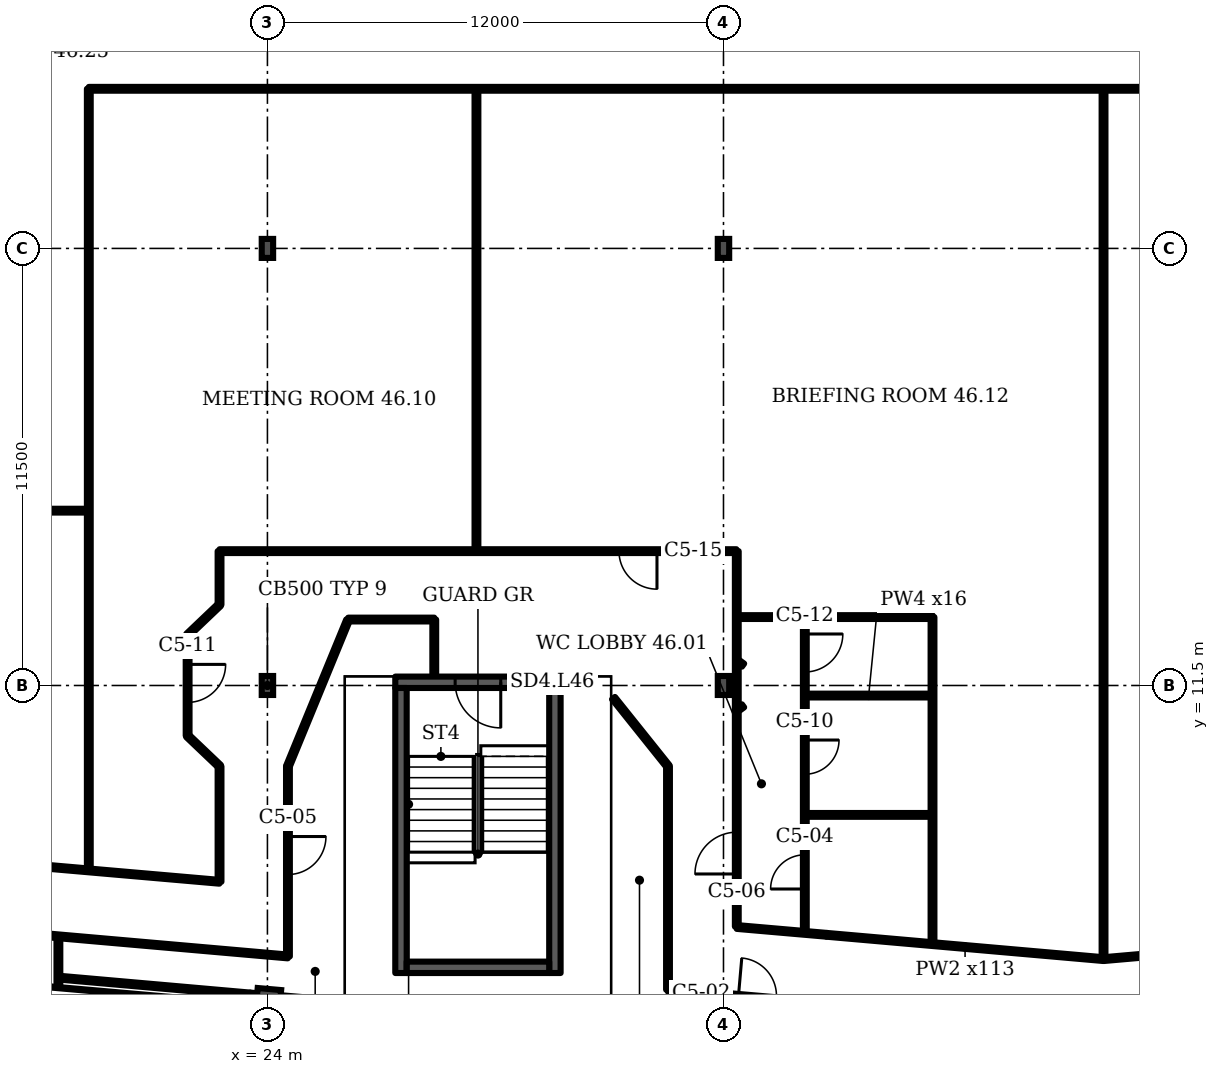
"""IFC4 building model, lengths in metres.
Left out: names, types, materials, properties, quantities, classifications, styles, units other than length and angle.
Written with IfcOpenShell. Run it as: python <this file> out.ifc"""

import sys

from ifc_helpers import new_model, si_unit, direction, frame, frame_2d, origin, origin_2d, place, context, subcontext, project, spatial, rectangle, i_section, extrude, element, fill, save


model = new_model("IFC4")
c1 = context("Model", 3, precision=1e-05, world=origin(), true_north=direction((0.0, 1.0)))
c2 = subcontext(c1, "Body", "Model", "MODEL_VIEW")
j1 = project(units=[si_unit("LENGTHUNIT", "METRE"), si_unit("PLANEANGLEUNIT", "RADIAN")], contexts=[c1])
p1 = place(None, origin())
s1 = spatial("IfcSite", under=j1, at=p1, CompositionType="ELEMENT")
p2 = place(p1, origin())
s2 = spatial("IfcBuilding", under=s1, at=p2, CompositionType="ELEMENT")
p3 = place(p2, frame((0.0, 0.0, 187.9)))
s3 = spatial("IfcBuildingStorey", under=s2, at=p3, CompositionType="ELEMENT", Elevation=187.9)
p4 = place(p3, frame((24.039, 3.361, 0.0), z_axis=(0.0, 0.0, 1.0), x_axis=(-0.087156, -0.996198, 0.0)))
e1 = element("IfcColumn", 1, at=p4, inside=s3, PredefinedType="COLUMN", context=c2, shape_type="SweptSolid", body=[
    extrude(i_section(OverallWidth=0.305, OverallDepth=0.62, WebThickness=0.021, FlangeThickness=0.04, FilletRadius=0.027, at=origin_2d()), origin(), (0.0, 0.0, 1.0), 3.6),
])
for number, where, z_axis, x_axis in (
    (2, (24.0, 11.5, 0.0), (0.0, 0.0, 1.0), (1.0, 0.0, 0.0)),
    (3, (36.0, 11.5, 0.0), (0.0, 0.0, 1.0), (1.0, 0.0, 0.0)),
    (4, (24.0, 23.0, 0.0), (0.0, 0.0, 1.0), (1.0, 0.0, 0.0)),
    (5, (36.0, 23.0, 0.0), (0.0, 0.0, 1.0), (1.0, 0.0, 0.0)),
):
    element("IfcColumn", number, at=place(p3, frame(where, z_axis=z_axis, x_axis=x_axis)), inside=s3, PredefinedType="COLUMN", context=c2, shape_type="SweptSolid", body=[
        extrude(i_section(OverallWidth=0.3, OverallDepth=0.5, WebThickness=0.014, FlangeThickness=0.028, FilletRadius=0.027, at=origin_2d()), origin(), (0.0, 0.0, 1.0), 3.6),
    ])
p5 = place(p3, frame((12.835, 3.885, 0.0), z_axis=(0.0, 0.0, 1.0), x_axis=(0.996199, -0.087154, 0.0)))
e6 = element("IfcWall", 6, at=p5, inside=s3, PredefinedType="SOLIDWALL", context=c2, shape_type="SweptSolid", body=[
    extrude(rectangle(XDim=11.177, YDim=0.35, at=frame_2d((5.588, 0.0))), origin(), (0.0, 0.0, 1.0), 1.0),
])
p6 = place(p3, frame((27.364, 11.584, 0.0), z_axis=(0.0, 0.0, 1.0), x_axis=(1.0, 0.0, 0.0)))
e7 = element("IfcWall", 7, at=p6, inside=s3, PredefinedType="SHEAR", context=c2, shape_type="SweptSolid", body=[
    extrude(rectangle(XDim=4.35, YDim=0.3, at=frame_2d((2.175, 0.0))), origin(), (0.0, 0.0, 1.0), 3.2),
])
p7 = place(p6, frame((1.575, 0.0, 0.0)))
e8 = element("IfcOpeningElement", 8, at=p7, cuts=e7, PredefinedType="OPENING", context=c2, shape_type="SweptSolid", body=[
    extrude(rectangle(XDim=1.2, YDim=2.1, at=frame_2d((0.6, 1.05))), frame((0.0, 0.16, 0.0), z_axis=(0.0, -1.0, 0.0), x_axis=(1.0, 0.0, 0.0)), (0.0, 0.0, 1.0), 0.32),
])
p8 = place(p3, frame((10.3, 16.1, 0.0), z_axis=(0.0, 0.0, 1.0), x_axis=(1.0, 0.0, 0.0)))
e9 = element("IfcWall", 9, at=p8, inside=s3, PredefinedType="PARTITIONING", context=c2, shape_type="SweptSolid", body=[
    extrude(rectangle(XDim=9.0, YDim=0.1, at=frame_2d((4.5, 0.0))), origin(), (0.0, 0.0, 1.0), 3.2),
])
p9 = place(p3, frame((18.5, 3.425, 0.0), z_axis=(0.0, 0.0, 1.0), x_axis=(0.0, 1.0, 0.0)))
e10 = element("IfcWall", 10, at=p9, inside=s3, PredefinedType="PARTITIONING", context=c2, shape_type="SweptSolid", body=[
    extrude(rectangle(XDim=1.475, YDim=0.1, at=frame_2d((0.737, 0.0))), origin(), (0.0, 0.0, 1.0), 2.58),
])
p10 = place(p3, frame((19.3, 6.705, 0.0), z_axis=(0.0, 0.0, 1.0), x_axis=(0.0, 1.0, 0.0)))
e11 = element("IfcWall", 11, at=p10, inside=s3, PredefinedType="PARTITIONING", context=c2, shape_type="SweptSolid", body=[
    extrude(rectangle(XDim=20.495, YDim=0.1, at=frame_2d((10.248, 0.0))), origin(), (0.0, 0.0, 1.0), 3.2),
])
p11 = place(p3, frame((19.3, 27.2, 0.0), z_axis=(0.0, 0.0, 1.0), x_axis=(1.0, 0.0, 0.0)))
e12 = element("IfcWall", 12, at=p11, inside=s3, PredefinedType="PARTITIONING", context=c2, shape_type="SweptSolid", body=[
    extrude(rectangle(XDim=41.305, YDim=0.1, at=frame_2d((20.652, 0.0))), origin(), (0.0, 0.0, 1.0), 3.2),
])
p12 = place(p11, frame((32.32, 0.0, 0.0)))
e13 = element("IfcOpeningElement", 13, at=p12, cuts=e12, PredefinedType="OPENING", context=c2, shape_type="SweptSolid", body=[
    extrude(rectangle(XDim=1.8, YDim=2.1, at=frame_2d((0.9, 1.05))), frame((0.0, 0.06, 0.0), z_axis=(0.0, -1.0, 0.0), x_axis=(1.0, 0.0, 0.0)), (0.0, 0.0, 1.0), 0.12),
])
p13 = place(p3, frame((21.9, 12.825, 0.0), z_axis=(0.0, 0.0, 1.0), x_axis=(0.724157, 0.689643, 0.0)))
e14 = element("IfcWall", 14, at=p13, inside=s3, PredefinedType="PARTITIONING", context=c2, shape_type="SweptSolid", body=[
    extrude(rectangle(XDim=1.16, YDim=0.1, at=frame_2d((0.58, 0.0))), origin(), (0.0, 0.0, 1.0), 3.2),
])
p14 = place(p3, frame((21.9, 10.175, 0.0), z_axis=(0.0, 0.0, 1.0), x_axis=(0.0, 1.0, 0.0)))
e15 = element("IfcWall", 15, at=p14, inside=s3, PredefinedType="PARTITIONING", context=c2, shape_type="SweptSolid", body=[
    extrude(rectangle(XDim=2.65, YDim=0.1, at=frame_2d((1.325, 0.0))), origin(), (0.0, 0.0, 1.0), 3.2),
])
p15 = place(p14, frame((0.88, 0.0, 0.0)))
e16 = element("IfcOpeningElement", 16, at=p15, cuts=e15, PredefinedType="OPENING", context=c2, shape_type="SweptSolid", body=[
    extrude(rectangle(XDim=1.0, YDim=2.1, at=frame_2d((0.5, 1.05))), frame((0.0, 0.06, 0.0), z_axis=(0.0, -1.0, 0.0), x_axis=(1.0, 0.0, 0.0)), (0.0, 0.0, 1.0), 0.12),
])
p16 = place(p3, frame((22.74, 9.375, 0.0), z_axis=(0.0, 0.0, 1.0), x_axis=(-0.724157, 0.689643, 0.0)))
e17 = element("IfcWall", 17, at=p16, inside=s3, PredefinedType="PARTITIONING", context=c2, shape_type="SweptSolid", body=[
    extrude(rectangle(XDim=1.16, YDim=0.1, at=frame_2d((0.58, 0.0))), origin(), (0.0, 0.0, 1.0), 3.2),
])
p17 = place(p3, frame((22.74, 6.335, 0.0), z_axis=(0.0, 0.0, 1.0), x_axis=(-0.996229, 0.086722, 0.0)))
e18 = element("IfcWall", 18, at=p17, inside=s3, PredefinedType="PARTITIONING", context=c2, shape_type="SweptSolid", body=[
    extrude(rectangle(XDim=6.478, YDim=0.1, at=frame_2d((3.239, 0.0))), origin(), (0.0, 0.0, 1.0), 3.2),
])
p18 = place(p3, frame((22.74, 6.335, 0.0), z_axis=(0.0, 0.0, 1.0), x_axis=(0.0, 1.0, 0.0)))
e19 = element("IfcWall", 19, at=p18, inside=s3, PredefinedType="PARTITIONING", context=c2, shape_type="SweptSolid", body=[
    extrude(rectangle(XDim=3.04, YDim=0.1, at=frame_2d((1.52, 0.0))), origin(), (0.0, 0.0, 1.0), 3.2),
])
p19 = place(p3, frame((22.74, 13.625, 0.0), z_axis=(0.0, 0.0, 1.0), x_axis=(0.0, 1.0, 0.0)))
e20 = element("IfcWall", 20, at=p19, inside=s3, PredefinedType="PARTITIONING", context=c2, shape_type="SweptSolid", body=[
    extrude(rectangle(XDim=1.41, YDim=0.1, at=frame_2d((0.705, 0.0))), origin(), (0.0, 0.0, 1.0), 3.2),
])
p20 = place(p3, frame((22.74, 15.035, 0.0), z_axis=(0.0, 0.0, 1.0), x_axis=(1.0, 0.0, 0.0)))
e21 = element("IfcWall", 21, at=p20, inside=s3, PredefinedType="PARTITIONING", context=c2, shape_type="SweptSolid", body=[
    extrude(rectangle(XDim=13.6, YDim=0.1, at=frame_2d((6.8, 0.0))), origin(), (0.0, 0.0, 1.0), 3.2),
])
p21 = place(p20, frame((10.51, 0.0, 0.0)))
e22 = element("IfcOpeningElement", 22, at=p21, cuts=e21, PredefinedType="OPENING", context=c2, shape_type="SweptSolid", body=[
    extrude(rectangle(XDim=1.0, YDim=2.1, at=frame_2d((0.5, 1.05))), frame((0.0, 0.06, 0.0), z_axis=(0.0, -1.0, 0.0), x_axis=(1.0, 0.0, 0.0)), (0.0, 0.0, 1.0), 0.12),
])
p22 = place(p3, frame((23.54, 3.37, 0.0), z_axis=(0.0, 0.0, 1.0), x_axis=(-0.996148, 0.087735, 0.0)))
e23 = element("IfcWall", 23, at=p22, inside=s3, PredefinedType="PARTITIONING", context=c2, shape_type="SweptSolid", body=[
    extrude(rectangle(XDim=5.014, YDim=0.1, at=frame_2d((2.507, 0.0))), origin(), (0.0, 0.0, 1.0), 2.58),
])
p23 = place(p3, frame((24.54, 9.375, 0.0), z_axis=(0.0, 0.0, 1.0), x_axis=(0.380187, 0.924914, 0.0)))
e24 = element("IfcWall", 24, at=p23, inside=s3, PredefinedType="PARTITIONING", context=c2, shape_type="SweptSolid", body=[
    extrude(rectangle(XDim=4.156, YDim=0.1, at=frame_2d((2.078, 0.0))), origin(), (0.0, 0.0, 1.0), 3.2),
])
p24 = place(p3, frame((24.54, 4.37, 0.0), z_axis=(0.0, 0.0, 1.0), x_axis=(0.0, 1.0, 0.0)))
e25 = element("IfcWall", 25, at=p24, inside=s3, PredefinedType="PARTITIONING", context=c2, shape_type="SweptSolid", body=[
    extrude(rectangle(XDim=5.005, YDim=0.1, at=frame_2d((2.502, 0.0))), origin(), (0.0, 0.0, 1.0), 3.2),
])
p25 = place(p24, frame((2.156, 0.0, 0.0)))
e26 = element("IfcOpeningElement", 26, at=p25, cuts=e25, PredefinedType="OPENING", context=c2, shape_type="SweptSolid", body=[
    extrude(rectangle(XDim=1.0, YDim=2.1, at=frame_2d((0.5, 1.05))), frame((0.0, 0.06, 0.0), z_axis=(0.0, -1.0, 0.0), x_axis=(1.0, 0.0, 0.0)), (0.0, 0.0, 1.0), 0.12),
])
p26 = place(p3, frame((24.54, 4.37, 0.0), z_axis=(0.0, 0.0, 1.0), x_axis=(-0.996178, 0.08739, 0.0)))
e27 = element("IfcWall", 27, at=p26, inside=s3, PredefinedType="PARTITIONING", context=c2, shape_type="SweptSolid", body=[
    extrude(rectangle(XDim=10.077, YDim=0.1, at=frame_2d((5.039, 0.0))), origin(), (0.0, 0.0, 1.0), 3.2),
])
p27 = place(p3, frame((26.019, 3.157, 0.0), z_axis=(0.0, 0.0, 1.0), x_axis=(-0.996317, 0.085749, 0.0)))
e28 = element("IfcWall", 28, at=p27, inside=s3, PredefinedType="PARTITIONING", context=c2, shape_type="SweptSolid", body=[
    extrude(rectangle(XDim=2.489, YDim=0.1, at=frame_2d((1.244, 0.0))), origin(), (0.0, 0.0, 1.0), 2.58),
])
p28 = place(p3, frame((26.125, 13.235, 0.0), z_axis=(0.0, 0.0, 1.0), x_axis=(1.0, 0.0, 0.0)))
e29 = element("IfcWall", 29, at=p28, inside=s3, PredefinedType="PARTITIONING", context=c2, shape_type="SweptSolid", body=[
    extrude(rectangle(XDim=2.265, YDim=0.1, at=frame_2d((1.132, 0.0))), origin(), (0.0, 0.0, 1.0), 3.2),
])
p29 = place(p3, frame((28.39, 11.754, 0.0), z_axis=(0.0, 0.0, 1.0), x_axis=(0.0, 1.0, 0.0)))
e30 = element("IfcWall", 30, at=p29, inside=s3, PredefinedType="PARTITIONING", context=c2, shape_type="SweptSolid", body=[
    extrude(rectangle(XDim=1.481, YDim=0.1, at=frame_2d((0.74, 0.0))), origin(), (0.0, 0.0, 1.0), 3.2),
])
p30 = place(p3, frame((29.5, 15.035, 0.0), z_axis=(0.0, 0.0, 1.0), x_axis=(0.0, 1.0, 0.0)))
e31 = element("IfcWall", 31, at=p30, inside=s3, PredefinedType="PARTITIONING", context=c2, shape_type="SweptSolid", body=[
    extrude(rectangle(XDim=12.165, YDim=0.1, at=frame_2d((6.083, 0.0))), origin(), (0.0, 0.0, 1.0), 3.2),
])
p31 = place(p3, frame((34.54, 3.495, 0.0), z_axis=(0.0, 0.0, 1.0), x_axis=(0.0, 1.0, 0.0)))
e32 = element("IfcWall", 32, at=p31, inside=s3, PredefinedType="PARTITIONING", context=c2, shape_type="SweptSolid", body=[
    extrude(rectangle(XDim=5.88, YDim=0.1, at=frame_2d((2.94, 0.0))), origin(), (0.0, 0.0, 1.0), 3.2),
])
p32 = place(p3, frame((34.54, 9.375, 0.0), z_axis=(0.0, 0.0, 1.0), x_axis=(-0.624735, 0.780839, 0.0)))
e33 = element("IfcWall", 33, at=p32, inside=s3, PredefinedType="PARTITIONING", context=c2, shape_type="SweptSolid", body=[
    extrude(rectangle(XDim=2.296, YDim=0.1, at=frame_2d((1.148, 0.0))), origin(), (0.0, 0.0, 1.0), 3.2),
])
p33 = place(p3, frame((36.35, 5.155, 0.0), z_axis=(0.0, 0.0, 1.0), x_axis=(0.0, 1.0, 0.0)))
e34 = element("IfcWall", 34, at=p33, inside=s3, PredefinedType="PARTITIONING", context=c2, shape_type="SweptSolid", body=[
    extrude(rectangle(XDim=9.88, YDim=0.1, at=frame_2d((4.94, 0.0))), origin(), (0.0, 0.0, 1.0), 3.2),
])
p34 = place(p33, frame((1.385, 0.0, 0.0)))
e35 = element("IfcOpeningElement", 35, at=p34, cuts=e34, PredefinedType="OPENING", context=c2, shape_type="SweptSolid", body=[
    extrude(rectangle(XDim=1.1, YDim=2.1, at=frame_2d((0.55, 1.05))), frame((0.0, 0.06, 0.0), z_axis=(0.0, -1.0, 0.0), x_axis=(1.0, 0.0, 0.0)), (0.0, 0.0, 1.0), 0.12),
])
p35 = place(p3, frame((36.35, 10.845, 0.0), z_axis=(0.0, 0.0, 1.0), x_axis=(0.808115, 0.589026, 0.0)))
e36 = element("IfcWall", 36, at=p35, inside=s3, PredefinedType="PARTITIONING", context=c2, shape_type="SweptSolid", body=[
    extrude(rectangle(XDim=0.204, YDim=0.1, at=frame_2d((0.102, 0.0))), origin(), (0.0, 0.0, 1.0), 3.2),
])
p36 = place(p3, frame((36.35, 13.3, 0.0), z_axis=(0.0, 0.0, 1.0), x_axis=(1.0, 0.0, 0.0)))
e37 = element("IfcWall", 37, at=p36, inside=s3, PredefinedType="PARTITIONING", context=c2, shape_type="SweptSolid", body=[
    extrude(rectangle(XDim=5.15, YDim=0.1, at=frame_2d((2.575, 0.0))), origin(), (0.0, 0.0, 1.0), 3.2),
])
p37 = place(p3, frame((36.515, 12.035, 0.0), z_axis=(0.0, 0.0, 1.0), x_axis=(-0.808115, 0.589026, 0.0)))
e38 = element("IfcWall", 38, at=p37, inside=s3, PredefinedType="PARTITIONING", context=c2, shape_type="SweptSolid", body=[
    extrude(rectangle(XDim=0.204, YDim=0.1, at=frame_2d((0.102, 0.0))), origin(), (0.0, 0.0, 1.0), 3.2),
])
p38 = place(p3, frame((38.14, 5.0, 0.0), z_axis=(0.0, 0.0, 1.0), x_axis=(0.0, 1.0, 0.0)))
e39 = element("IfcWall", 39, at=p38, inside=s3, PredefinedType="PARTITIONING", context=c2, shape_type="SweptSolid", body=[
    extrude(rectangle(XDim=8.3, YDim=0.1, at=frame_2d((4.15, 0.0))), origin(), (0.0, 0.0, 1.0), 3.2),
])
p39 = place(p38, frame((1.145, 0.0, 0.0)))
e40 = element("IfcOpeningElement", 40, at=p39, cuts=e39, PredefinedType="OPENING", context=c2, shape_type="SweptSolid", body=[
    extrude(rectangle(XDim=0.9, YDim=2.1, at=frame_2d((0.45, 1.05))), frame((0.0, 0.06, 0.0), z_axis=(0.0, -1.0, 0.0), x_axis=(1.0, 0.0, 0.0)), (0.0, 0.0, 1.0), 0.12),
])
p40 = place(p38, frame((4.165, 0.0, 0.0)))
e41 = element("IfcOpeningElement", 41, at=p40, cuts=e39, PredefinedType="OPENING", context=c2, shape_type="SweptSolid", body=[
    extrude(rectangle(XDim=0.9, YDim=2.1, at=frame_2d((0.45, 1.05))), frame((0.0, 0.06, 0.0), z_axis=(0.0, -1.0, 0.0), x_axis=(1.0, 0.0, 0.0)), (0.0, 0.0, 1.0), 0.12),
])
p41 = place(p38, frame((6.855, 0.0, 0.0)))
e42 = element("IfcOpeningElement", 42, at=p41, cuts=e39, PredefinedType="OPENING", context=c2, shape_type="SweptSolid", body=[
    extrude(rectangle(XDim=1.0, YDim=2.1, at=frame_2d((0.5, 1.05))), frame((0.0, 0.06, 0.0), z_axis=(0.0, -1.0, 0.0), x_axis=(1.0, 0.0, 0.0)), (0.0, 0.0, 1.0), 0.12),
])
for number, where, z_axis, x_axis in (
    (43, (38.14, 8.095, 0.0), (0.0, 0.0, 1.0), (1.0, 0.0, 0.0)),
    (44, (38.14, 11.235, 0.0), (0.0, 0.0, 1.0), (1.0, 0.0, 0.0)),
):
    element("IfcWall", number, at=place(p3, frame(where, z_axis=z_axis, x_axis=x_axis)), inside=s3, PredefinedType="PARTITIONING", context=c2, shape_type="SweptSolid", body=[
        extrude(rectangle(XDim=3.36, YDim=0.1, at=frame_2d((1.68, 0.0))), origin(), (0.0, 0.0, 1.0), 3.2),
    ])
p42 = place(p3, frame((38.715, 4.94, 0.0), z_axis=(0.0, 0.0, 1.0), x_axis=(-0.996236, 0.086674, 0.0)))
e45 = element("IfcWall", 45, at=p42, inside=s3, PredefinedType="PARTITIONING", context=c2, shape_type="SweptSolid", body=[
    extrude(rectangle(XDim=2.372, YDim=0.1, at=frame_2d((1.186, 0.0))), origin(), (0.0, 0.0, 1.0), 3.2),
])
p43 = place(p3, frame((41.5, 4.695, 0.0), z_axis=(0.0, 0.0, 1.0), x_axis=(0.0, 1.0, 0.0)))
e46 = element("IfcWall", 46, at=p43, inside=s3, PredefinedType="PARTITIONING", context=c2, shape_type="SweptSolid", body=[
    extrude(rectangle(XDim=8.605, YDim=0.1, at=frame_2d((4.302, 0.0))), origin(), (0.0, 0.0, 1.0), 3.2),
])
p44 = place(p3, frame((46.0, 4.3, 0.0), z_axis=(0.0, 0.0, 1.0), x_axis=(-0.996173, 0.087448, 0.0)))
e47 = element("IfcWall", 47, at=p44, inside=s3, PredefinedType="PARTITIONING", context=c2, shape_type="SweptSolid", body=[
    extrude(rectangle(XDim=7.315, YDim=0.1, at=frame_2d((3.657, 0.0))), origin(), (0.0, 0.0, 1.0), 3.2),
])
p45 = place(p3, frame((46.0, 2.495, 0.0), z_axis=(0.0, 0.0, 1.0), x_axis=(-0.996214, 0.08693, 0.0)))
e48 = element("IfcWall", 48, at=p45, inside=s3, PredefinedType="PARTITIONING", context=c2, shape_type="SweptSolid", body=[
    extrude(rectangle(XDim=11.503, YDim=0.1, at=frame_2d((5.752, 0.0))), origin(), (0.0, 0.0, 1.0), 3.2),
])
p46 = place(p45, frame((8.642, 0.0, 0.0)))
e49 = element("IfcOpeningElement", 49, at=p46, cuts=e48, PredefinedType="OPENING", context=c2, shape_type="SweptSolid", body=[
    extrude(rectangle(XDim=1.0, YDim=2.1, at=frame_2d((0.5, 1.05))), frame((0.0, 0.06, 0.0), z_axis=(0.0, -1.0, 0.0), x_axis=(1.0, 0.0, 0.0)), (0.0, 0.0, 1.0), 0.12),
])
p47 = place(p3, frame((46.0, 4.3, 0.0), z_axis=(0.0, 0.0, 1.0), x_axis=(0.0, 1.0, 0.0)))
e50 = element("IfcWall", 50, at=p47, inside=s3, PredefinedType="PARTITIONING", context=c2, shape_type="SweptSolid", body=[
    extrude(rectangle(XDim=22.9, YDim=0.1, at=frame_2d((11.45, 0.0))), origin(), (0.0, 0.0, 1.0), 3.2),
])
p48 = place(p3, frame((46.0, 4.3, 0.0), z_axis=(0.0, 0.0, 1.0), x_axis=(0.996189, 0.087194, 0.0)))
e51 = element("IfcWall", 51, at=p48, inside=s3, PredefinedType="PARTITIONING", context=c2, shape_type="SweptSolid", body=[
    extrude(rectangle(XDim=12.558, YDim=0.1, at=frame_2d((6.279, 0.0))), origin(), (0.0, 0.0, 1.0), 3.2),
])
for number, where, z_axis, x_axis in (
    (52, (27.514, 3.934, 0.0), (0.0, 0.0, 1.0), (0.0, 1.0, 0.0)),
    (53, (31.564, 3.934, 0.0), (0.0, 0.0, 1.0), (0.0, 1.0, 0.0)),
):
    element("IfcWall", number, at=place(p3, frame(where, z_axis=z_axis, x_axis=x_axis)), inside=s3, PredefinedType="SHEAR", context=c2, shape_type="SweptSolid", body=[
        extrude(rectangle(XDim=7.5, YDim=0.3, at=frame_2d((3.75, 0.0))), origin(), (0.0, 0.0, 1.0), 3.2),
    ])
p49 = place(p3, frame((27.664, 4.084, 0.0), z_axis=(0.0, 0.0, 1.0), x_axis=(1.0, 0.0, 0.0)))
e54 = element("IfcWall", 54, at=p49, inside=s3, PredefinedType="SHEAR", context=c2, shape_type="SweptSolid", body=[
    extrude(rectangle(XDim=3.75, YDim=0.3, at=frame_2d((1.875, 0.0))), origin(), (0.0, 0.0, 1.0), 3.2),
])
p50 = place(p7, origin())
e55 = element("IfcDoor", 55, at=p50, inside=s3, OperationType="SINGLE_SWING_RIGHT", PredefinedType="DOOR", context=c2, shape_type="SweptSolid", body=[
    extrude(rectangle(XDim=1.2, YDim=2.1, at=frame_2d((0.6, 1.05))), frame((0.0, 0.025, 0.0), z_axis=(0.0, -1.0, 0.0), x_axis=(1.0, 0.0, 0.0)), (0.0, 0.0, 1.0), 0.05),
])
fill(e8, e55)
p51 = place(p46, origin())
e56 = element("IfcDoor", 56, at=p51, inside=s3, OperationType="SINGLE_SWING_RIGHT", PredefinedType="DOOR", context=c2, shape_type="SweptSolid", body=[
    extrude(rectangle(XDim=1.0, YDim=2.1, at=frame_2d((0.5, 1.05))), frame((0.0, 0.025, 0.0), z_axis=(0.0, -1.0, 0.0), x_axis=(1.0, 0.0, 0.0)), (0.0, 0.0, 1.0), 0.05),
])
fill(e49, e56)
p52 = place(p39, origin())
e57 = element("IfcDoor", 57, at=p52, inside=s3, OperationType="SINGLE_SWING_LEFT", PredefinedType="DOOR", context=c2, shape_type="SweptSolid", body=[
    extrude(rectangle(XDim=0.9, YDim=2.1, at=frame_2d((0.45, 1.05))), frame((0.0, 0.025, 0.0), z_axis=(0.0, -1.0, 0.0), x_axis=(1.0, 0.0, 0.0)), (0.0, 0.0, 1.0), 0.05),
])
fill(e40, e57)
p53 = place(p25, origin())
e58 = element("IfcDoor", 58, at=p53, inside=s3, OperationType="SINGLE_SWING_RIGHT", PredefinedType="DOOR", context=c2, shape_type="SweptSolid", body=[
    extrude(rectangle(XDim=1.0, YDim=2.1, at=frame_2d((0.5, 1.05))), frame((0.0, 0.025, 0.0), z_axis=(0.0, -1.0, 0.0), x_axis=(1.0, 0.0, 0.0)), (0.0, 0.0, 1.0), 0.05),
])
fill(e26, e58)
p54 = place(p34, origin())
e59 = element("IfcDoor", 59, at=p54, inside=s3, OperationType="SINGLE_SWING_LEFT", PredefinedType="DOOR", context=c2, shape_type="SweptSolid", body=[
    extrude(rectangle(XDim=1.1, YDim=2.1, at=frame_2d((0.55, 1.05))), frame((0.0, 0.025, 0.0), z_axis=(0.0, -1.0, 0.0), x_axis=(1.0, 0.0, 0.0)), (0.0, 0.0, 1.0), 0.05),
])
fill(e35, e59)
p55 = place(p40, origin())
e60 = element("IfcDoor", 60, at=p55, inside=s3, OperationType="SINGLE_SWING_RIGHT", PredefinedType="DOOR", context=c2, shape_type="SweptSolid", body=[
    extrude(rectangle(XDim=0.9, YDim=2.1, at=frame_2d((0.45, 1.05))), frame((0.0, 0.025, 0.0), z_axis=(0.0, -1.0, 0.0), x_axis=(1.0, 0.0, 0.0)), (0.0, 0.0, 1.0), 0.05),
])
fill(e41, e60)
p56 = place(p15, origin())
e61 = element("IfcDoor", 61, at=p56, inside=s3, OperationType="SINGLE_SWING_RIGHT", PredefinedType="DOOR", context=c2, shape_type="SweptSolid", body=[
    extrude(rectangle(XDim=1.0, YDim=2.1, at=frame_2d((0.5, 1.05))), frame((0.0, 0.025, 0.0), z_axis=(0.0, -1.0, 0.0), x_axis=(1.0, 0.0, 0.0)), (0.0, 0.0, 1.0), 0.05),
])
fill(e16, e61)
p57 = place(p41, origin())
e62 = element("IfcDoor", 62, at=p57, inside=s3, OperationType="SINGLE_SWING_RIGHT", PredefinedType="DOOR", context=c2, shape_type="SweptSolid", body=[
    extrude(rectangle(XDim=1.0, YDim=2.1, at=frame_2d((0.5, 1.05))), frame((0.0, 0.025, 0.0), z_axis=(0.0, -1.0, 0.0), x_axis=(1.0, 0.0, 0.0)), (0.0, 0.0, 1.0), 0.05),
])
fill(e42, e62)
p58 = place(p21, origin())
e63 = element("IfcDoor", 63, at=p58, inside=s3, OperationType="SINGLE_SWING_RIGHT", PredefinedType="DOOR", context=c2, shape_type="SweptSolid", body=[
    extrude(rectangle(XDim=1.0, YDim=2.1, at=frame_2d((0.5, 1.05))), frame((0.0, 0.025, 0.0), z_axis=(0.0, -1.0, 0.0), x_axis=(1.0, 0.0, 0.0)), (0.0, 0.0, 1.0), 0.05),
])
fill(e22, e63)
save(model, sys.argv[1])
